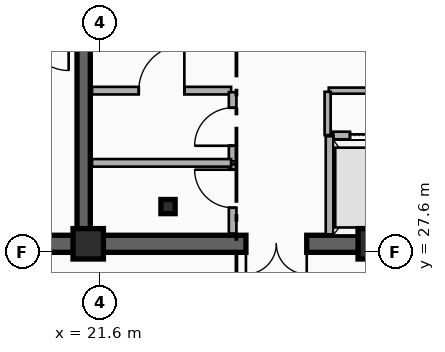
"""IFC4 building model, lengths in metres.
Left out: names, types, materials, properties, quantities, classifications, styles, units other than length and angle.
Written with IfcOpenShell. Run it as: python <this file> out.ifc"""

import sys

from ifc_helpers import new_model, si_unit, direction, frame, frame_2d, origin, origin_2d, place, context, subcontext, project, spatial, rectangle, i_section, extrude, element, fill, save


model = new_model("IFC4")
c1 = context("Model", 3, precision=1e-05, world=origin(), true_north=direction((0.0, 1.0)))
c2 = subcontext(c1, "Body", "Model", "MODEL_VIEW")
j1 = project(units=[si_unit("LENGTHUNIT", "METRE"), si_unit("PLANEANGLEUNIT", "RADIAN")], contexts=[c1])
p1 = place(None, origin())
s1 = spatial("IfcSite", under=j1, at=p1, CompositionType="ELEMENT")
p2 = place(p1, origin())
s2 = spatial("IfcBuilding", under=s1, at=p2, CompositionType="ELEMENT")
p3 = place(p2, frame((0.0, 0.0, 276.9)))
s3 = spatial("IfcBuildingStorey", under=s2, at=p3, CompositionType="ELEMENT", Elevation=276.9)
p4 = place(p3, frame((21.18, 27.82, 0.0), z_axis=(0.0, 0.0, 1.0), x_axis=(-1.0, 0.0, 0.0)))
e1 = element("IfcWall", 1, at=p4, inside=s3, PredefinedType="SHEAR", context=c2, shape_type="SweptSolid", body=[
    extrude(rectangle(XDim=9.03, YDim=0.45, at=frame_2d((4.515, 0.0))), origin(), (0.0, 0.0, 1.0), 3.7),
])
p5 = place(p4, frame((2.68, 0.0, 0.0)))
e2 = element("IfcOpeningElement", 2, at=p5, cuts=e1, PredefinedType="OPENING", context=c2, shape_type="SweptSolid", body=[
    extrude(rectangle(XDim=1.1, YDim=2.15, at=frame_2d((0.55, 1.075))), frame((0.0, 0.235, 0.0), z_axis=(0.0, -1.0, 0.0), x_axis=(1.0, 0.0, 0.0)), (0.0, 0.0, 1.0), 0.47),
])
p6 = place(p3, frame((33.15, 27.82, 0.0), z_axis=(0.0, 0.0, 1.0), x_axis=(-1.0, 0.0, 0.0)))
e3 = element("IfcWall", 3, at=p6, inside=s3, PredefinedType="SHEAR", context=c2, shape_type="SweptSolid", body=[
    extrude(rectangle(XDim=11.97, YDim=0.45, at=frame_2d((5.985, 0.0))), origin(), (0.0, 0.0, 1.0), 3.7),
])
p7 = place(p6, frame((6.1, 0.0, 0.0)))
e4 = element("IfcOpeningElement", 4, at=p7, cuts=e3, PredefinedType="OPENING", context=c2, shape_type="SweptSolid", body=[
    extrude(rectangle(XDim=1.6, YDim=2.2, at=frame_2d((0.8, 1.1))), frame((0.0, 0.235, 0.0), z_axis=(0.0, -1.0, 0.0), x_axis=(1.0, 0.0, 0.0)), (0.0, 0.0, 1.0), 0.47),
])
p8 = place(p3, frame((21.18, 28.045, 0.0), z_axis=(0.0, 0.0, 1.0), x_axis=(0.0, 1.0, 0.0)))
e5 = element("IfcWall", 5, at=p8, inside=s3, PredefinedType="SHEAR", context=c2, shape_type="SweptSolid", body=[
    extrude(rectangle(XDim=8.78, YDim=0.35, at=frame_2d((4.39, 0.0))), origin(), (0.0, 0.0, 1.0), 3.7),
])
p9 = place(p3, frame((23.4, 28.8, 0.0), z_axis=(0.0, 0.0, 1.0), x_axis=(1.0, 0.0, 0.0)))
e6 = element("IfcColumn", 6, at=p9, inside=s3, PredefinedType="COLUMN", context=c2, shape_type="SweptSolid", body=[
    extrude(i_section(OverallWidth=0.374, OverallDepth=0.372, WebThickness=0.017, FlangeThickness=0.027, FilletRadius=0.015, at=origin_2d()), origin(), (0.0, 0.0, 1.0), 3.7),
])
for number, where, z_axis, x_axis in (
    (7, (21.3, 27.82, 0.0), (0.0, 0.0, 1.0), (1.0, 0.0, 0.0)),
    (8, (28.8, 27.82, 0.0), (0.0, 0.0, 1.0), (1.0, 0.0, 0.0)),
):
    element("IfcColumn", number, at=place(p3, frame(where, z_axis=z_axis, x_axis=x_axis)), inside=s3, PredefinedType="COLUMN", context=c2, shape_type="SweptSolid", body=[
        extrude(rectangle(XDim=0.8, YDim=0.8, at=origin_2d()), origin(), (0.0, 0.0, 1.0), 3.7),
    ])
p10 = place(p3, frame((27.75, 30.67, 0.0), z_axis=(0.0, 0.0, 1.0), x_axis=(1.0, 0.0, 0.0)))
e9 = element("IfcWall", 9, at=p10, inside=s3, PredefinedType="PARTITIONING", context=c2, shape_type="SweptSolid", body=[
    extrude(rectangle(XDim=1.975, YDim=0.2, at=frame_2d((0.988, 0.0))), origin(), (0.0, 0.0, 1.0), 2.45),
])
p11 = place(p10, frame((0.438, 0.0, 0.0)))
e10 = element("IfcOpeningElement", 10, at=p11, cuts=e9, PredefinedType="OPENING", context=c2, shape_type="SweptSolid", body=[
    extrude(rectangle(XDim=1.1, YDim=2.15, at=frame_2d((0.55, 1.075))), frame((0.0, 0.11, 0.0), z_axis=(0.0, -1.0, 0.0), x_axis=(1.0, 0.0, 0.0)), (0.0, 0.0, 1.0), 0.22),
])
p12 = place(p3, frame((27.65, 28.07, 0.0), z_axis=(0.0, 0.0, 1.0), x_axis=(0.0, 1.0, 0.0)))
e11 = element("IfcWall", 11, at=p12, inside=s3, PredefinedType="PARTITIONING", context=c2, shape_type="SweptSolid", body=[
    extrude(rectangle(XDim=2.58, YDim=0.2, at=frame_2d((1.29, 0.0))), origin(), (0.0, 0.0, 1.0), 2.45),
])
p13 = place(p3, frame((21.4, 31.85, 0.0), z_axis=(0.0, 0.0, 1.0), x_axis=(1.0, 0.0, 0.0)))
e12 = element("IfcWall", 12, at=p13, inside=s3, PredefinedType="PARTITIONING", context=c2, shape_type="SweptSolid", body=[
    extrude(rectangle(XDim=3.66, YDim=0.2, at=frame_2d((1.83, 0.0))), origin(), (0.0, 0.0, 1.0), 2.45),
])
p14 = place(p13, frame((1.23, 0.0, 0.0)))
e13 = element("IfcOpeningElement", 13, at=p14, cuts=e12, PredefinedType="OPENING", context=c2, shape_type="SweptSolid", body=[
    extrude(rectangle(XDim=1.2, YDim=2.15, at=frame_2d((0.6, 1.075))), frame((0.0, 0.11, 0.0), z_axis=(0.0, -1.0, 0.0), x_axis=(1.0, 0.0, 0.0)), (0.0, 0.0, 1.0), 0.22),
])
p15 = place(p3, frame((25.1, 28.09, 0.0), z_axis=(0.0, 0.0, 1.0), x_axis=(0.0, 1.0, 0.0)))
e14 = element("IfcWall", 14, at=p15, inside=s3, PredefinedType="PARTITIONING", context=c2, shape_type="SweptSolid", body=[
    extrude(rectangle(XDim=1.82, YDim=0.2, at=frame_2d((0.91, 0.0))), origin(), (0.0, 0.0, 1.0), 2.76),
])
p16 = place(p15, frame((0.68, 0.0, 0.0)))
e15 = element("IfcOpeningElement", 15, at=p16, cuts=e14, PredefinedType="OPENING", context=c2, shape_type="SweptSolid", body=[
    extrude(rectangle(XDim=1.0, YDim=2.15, at=frame_2d((0.5, 1.075))), frame((0.0, 0.11, 0.0), z_axis=(0.0, -1.0, 0.0), x_axis=(1.0, 0.0, 0.0)), (0.0, 0.0, 1.0), 0.22),
])
p17 = place(p3, frame((25.1, 29.99, 0.0), z_axis=(0.0, 0.0, 1.0), x_axis=(0.0, 1.0, 0.0)))
e16 = element("IfcWall", 16, at=p17, inside=s3, PredefinedType="PARTITIONING", context=c2, shape_type="SweptSolid", body=[
    extrude(rectangle(XDim=1.82, YDim=0.2, at=frame_2d((0.91, 0.0))), origin(), (0.0, 0.0, 1.0), 3.38),
])
p18 = place(p17, frame((0.41, 0.0, 0.0)))
e17 = element("IfcOpeningElement", 17, at=p18, cuts=e16, PredefinedType="OPENING", context=c2, shape_type="SweptSolid", body=[
    extrude(rectangle(XDim=1.0, YDim=2.15, at=frame_2d((0.5, 1.075))), frame((0.0, 0.11, 0.0), z_axis=(0.0, -1.0, 0.0), x_axis=(1.0, 0.0, 0.0)), (0.0, 0.0, 1.0), 0.22),
])
p19 = place(p3, frame((21.4, 29.95, 0.0), z_axis=(0.0, 0.0, 1.0), x_axis=(1.0, 0.0, 0.0)))
e18 = element("IfcWall", 18, at=p19, inside=s3, PredefinedType="PARTITIONING", context=c2, shape_type="SweptSolid", body=[
    extrude(rectangle(XDim=3.66, YDim=0.2, at=frame_2d((1.83, 0.0))), origin(), (0.0, 0.0, 1.0), 2.45),
])
p20 = place(p3, frame((27.63, 31.85, 0.0), z_axis=(0.0, 0.0, 1.0), x_axis=(1.0, 0.0, 0.0)))
e19 = element("IfcWall", 19, at=p20, inside=s3, PredefinedType="PARTITIONING", context=c2, shape_type="SweptSolid", body=[
    extrude(rectangle(XDim=5.31, YDim=0.16, at=frame_2d((2.655, 0.0))), origin(), (0.0, 0.0, 1.0), 2.45),
])
p21 = place(p3, frame((27.6, 30.68, 0.0), z_axis=(0.0, 0.0, 1.0), x_axis=(0.0, 1.0, 0.0)))
e20 = element("IfcWall", 20, at=p21, inside=s3, PredefinedType="PARTITIONING", context=c2, shape_type="SweptSolid", body=[
    extrude(rectangle(XDim=1.14, YDim=0.16, at=frame_2d((0.57, 0.0))), origin(), (0.0, 0.0, 1.0), 3.38),
])
p22 = place(p11, origin())
e21 = element("IfcDoor", 21, at=p22, inside=s3, OperationType="DOUBLE_DOOR_SLIDING", PredefinedType="DOOR", context=c2, shape_type="SweptSolid", body=[
    extrude(rectangle(XDim=1.1, YDim=2.15, at=frame_2d((0.55, 1.075))), frame((0.0, 0.025, 0.0), z_axis=(0.0, -1.0, 0.0), x_axis=(1.0, 0.0, 0.0)), (0.0, 0.0, 1.0), 0.05),
])
fill(e10, e21)
p23 = place(p7, origin())
e22 = element("IfcDoor", 22, at=p23, inside=s3, OperationType="SINGLE_SWING_LEFT", PredefinedType="DOOR", context=c2, shape_type="SweptSolid", body=[
    extrude(rectangle(XDim=1.6, YDim=2.2, at=frame_2d((0.8, 1.1))), frame((0.0, 0.025, 0.0), z_axis=(0.0, -1.0, 0.0), x_axis=(1.0, 0.0, 0.0)), (0.0, 0.0, 1.0), 0.05),
])
fill(e4, e22)
p24 = place(p14, origin())
e23 = element("IfcDoor", 23, at=p24, inside=s3, OperationType="SINGLE_SWING_RIGHT", PredefinedType="DOOR", context=c2, shape_type="SweptSolid", body=[
    extrude(rectangle(XDim=1.2, YDim=2.15, at=frame_2d((0.6, 1.075))), frame((0.0, 0.025, 0.0), z_axis=(0.0, -1.0, 0.0), x_axis=(1.0, 0.0, 0.0)), (0.0, 0.0, 1.0), 0.05),
])
fill(e13, e23)
p25 = place(p16, origin())
e24 = element("IfcDoor", 24, at=p25, inside=s3, OperationType="SINGLE_SWING_RIGHT", PredefinedType="DOOR", context=c2, shape_type="SweptSolid", body=[
    extrude(rectangle(XDim=1.0, YDim=2.15, at=frame_2d((0.5, 1.075))), frame((0.0, 0.025, 0.0), z_axis=(0.0, -1.0, 0.0), x_axis=(1.0, 0.0, 0.0)), (0.0, 0.0, 1.0), 0.05),
])
fill(e15, e24)
p26 = place(p18, origin())
e25 = element("IfcDoor", 25, at=p26, inside=s3, OperationType="SINGLE_SWING_LEFT", PredefinedType="DOOR", context=c2, shape_type="SweptSolid", body=[
    extrude(rectangle(XDim=1.0, YDim=2.15, at=frame_2d((0.5, 1.075))), frame((0.0, 0.025, 0.0), z_axis=(0.0, -1.0, 0.0), x_axis=(1.0, 0.0, 0.0)), (0.0, 0.0, 1.0), 0.05),
])
fill(e17, e25)
save(model, sys.argv[1])
